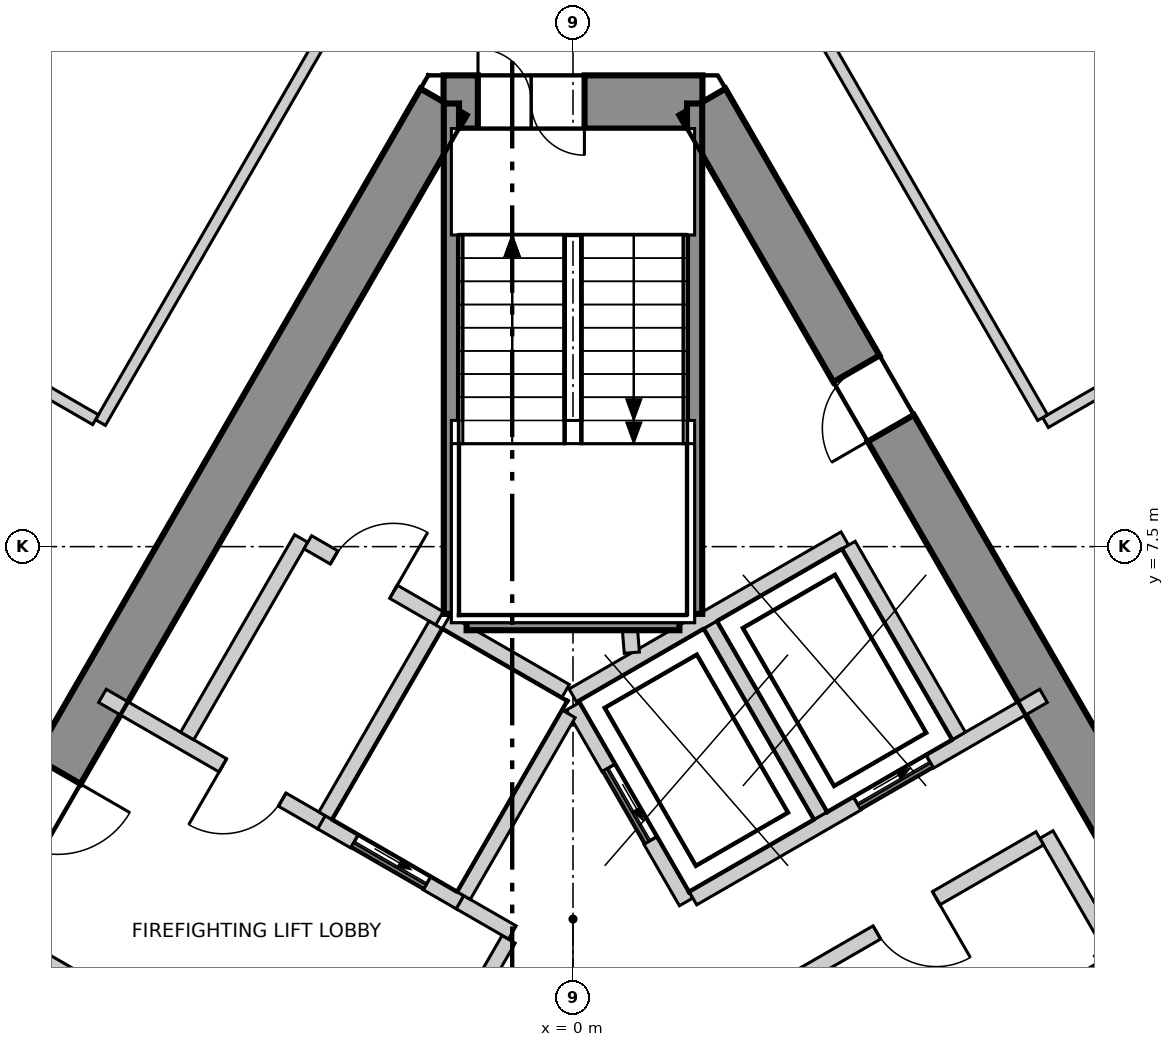
"""IFC4 building model, lengths in metres.
Left out: names, types, materials, properties, quantities, classifications, styles, units other than length and angle.
Written with IfcOpenShell. Run it as: python <this file> out.ifc"""

import sys

from ifc_helpers import new_model, si_unit, direction, frame, frame_2d, origin, place, context, subcontext, project, spatial, polyline, rectangle, outline, extrude, element, fill, save


model = new_model("IFC4")
c1 = context("Model", 3, precision=1e-05, world=origin(), true_north=direction((0.0, 1.0)))
c2 = subcontext(c1, "Body", "Model", "MODEL_VIEW")
j1 = project(units=[si_unit("LENGTHUNIT", "METRE"), si_unit("PLANEANGLEUNIT", "RADIAN")], contexts=[c1])
p1 = place(None, origin())
s1 = spatial("IfcSite", under=j1, at=p1, CompositionType="ELEMENT")
p2 = place(p1, origin())
s2 = spatial("IfcBuilding", under=s1, at=p2, CompositionType="ELEMENT")
p3 = place(p2, frame((0.0, 0.0, 255.8)))
s3 = spatial("IfcBuildingStorey", under=s2, at=p3, CompositionType="ELEMENT", Elevation=255.8)
p4 = place(p3, frame((1.703, 13.35, -0.6), z_axis=(0.0, 0.0, 1.0), x_axis=(-1.0, 0.0, 0.0)))
e1 = element("IfcWall", 1, at=p4, inside=s3, PredefinedType="SHEAR", context=c2, shape_type="SweptSolid", body=[
    extrude(outline(polyline([(-0.202, -0.35), (1.703, -0.35), (3.608, -0.35), (3.204, 0.35), (1.703, 0.35), (0.202, 0.35), (-0.202, -0.35)])), origin(), (0.0, 0.0, 1.0), 6.3),
])
p5 = place(p4, frame((1.553, 0.0, 0.6)))
e2 = element("IfcOpeningElement", 2, at=p5, cuts=e1, PredefinedType="OPENING", context=c2, shape_type="SweptSolid", body=[
    extrude(rectangle(XDim=1.4, YDim=2.1, at=frame_2d((0.7, 1.05))), frame((0.0, 0.36, 0.0), z_axis=(0.0, -1.0, 0.0), x_axis=(1.0, 0.0, 0.0)), (0.0, 0.0, 1.0), 0.72),
])
p6 = place(p3, frame((-1.703, 13.35, -0.6), z_axis=(0.0, 0.0, 1.0), x_axis=(-0.500011533395, -0.866018744874, 0.0)))
e3 = element("IfcWall", 3, at=p6, inside=s3, PredefinedType="SHEAR", context=c2, shape_type="SweptSolid", body=[
    extrude(outline(polyline([(-0.202, -0.35), (1.782, -0.35), (3.766, -0.35), (5.75, -0.35), (7.734, -0.35), (9.718, -0.35), (11.702, -0.35), (13.686, -0.35), (15.67, -0.35), (17.654, -0.35), (19.638, -0.35), (21.622, -0.35), (21.218, 0.35), (19.307, 0.35), (17.397, 0.35), (15.486, 0.35), (13.576, 0.35), (11.665, 0.35), (9.755, 0.35), (7.844, 0.35), (5.934, 0.35), (4.023, 0.35), (2.113, 0.35), (0.202, 0.35), (-0.202, -0.35)])), origin(), (0.0, 0.0, 1.0), 6.3),
])
p7 = place(p6, frame((10.16, 0.0, 0.6)))
e4 = element("IfcOpeningElement", 4, at=p7, cuts=e3, PredefinedType="OPENING", context=c2, shape_type="SweptSolid", body=[
    extrude(rectangle(XDim=1.1, YDim=2.1, at=frame_2d((0.55, 1.05))), frame((0.0, 0.36, 0.0), z_axis=(0.0, -1.0, 0.0), x_axis=(1.0, 0.0, 0.0)), (0.0, 0.0, 1.0), 0.72),
])
p8 = place(p3, frame((12.413, -5.2, -0.6), z_axis=(0.0, 0.0, 1.0), x_axis=(-0.500011533395, 0.866018744874, 0.0)))
e5 = element("IfcWall", 5, at=p8, inside=s3, PredefinedType="SHEAR", context=c2, shape_type="SweptSolid", body=[
    extrude(outline(polyline([(-0.202, -0.35), (1.782, -0.35), (3.766, -0.35), (5.75, -0.35), (7.734, -0.35), (9.718, -0.35), (11.702, -0.35), (13.686, -0.35), (15.67, -0.35), (17.654, -0.35), (19.638, -0.35), (21.622, -0.35), (21.218, 0.35), (19.307, 0.35), (17.397, 0.35), (15.486, 0.35), (13.576, 0.35), (11.665, 0.35), (9.755, 0.35), (7.844, 0.35), (5.934, 0.35), (4.023, 0.35), (2.113, 0.35), (0.202, 0.35), (-0.202, -0.35)])), origin(), (0.0, 0.0, 1.0), 6.3),
])
p9 = place(p8, frame((16.465, 0.0, 0.6)))
e6 = element("IfcOpeningElement", 6, at=p9, cuts=e5, PredefinedType="OPENING", context=c2, shape_type="SweptSolid", body=[
    extrude(rectangle(XDim=0.9, YDim=2.1, at=frame_2d((0.45, 1.05))), frame((0.0, 0.36, 0.0), z_axis=(0.0, -1.0, 0.0), x_axis=(1.0, 0.0, 0.0)), (0.0, 0.0, 1.0), 0.72),
])
p10 = place(p3, frame((-6.217, 9.132, 0.0), z_axis=(0.0, 0.0, 1.0), x_axis=(0.500076232498, 0.865981386458, 0.0)))
e7 = element("IfcWall", 7, at=p10, inside=s3, PredefinedType="PARTITIONING", context=c2, shape_type="SweptSolid", body=[
    extrude(rectangle(XDim=6.949, YDim=0.15, at=frame_2d((3.475, 0.0))), origin(), (0.0, 0.0, 1.0), 5.7),
])
p11 = place(p3, frame((-12.255, 12.618, 0.0), z_axis=(0.0, 0.0, 1.0), x_axis=(0.866054133163, -0.499950235956, 0.0)))
e8 = element("IfcWall", 8, at=p11, inside=s3, PredefinedType="PARTITIONING", context=c2, shape_type="SweptSolid", body=[
    extrude(rectangle(XDim=6.897, YDim=0.15, at=frame_2d((3.448, 0.0))), origin(), (0.0, 0.0, 1.0), 5.7),
])
p12 = place(p11, frame((2.886, 0.0, 0.0)))
e9 = element("IfcOpeningElement", 9, at=p12, cuts=e8, PredefinedType="OPENING", context=c2, shape_type="SweptSolid", body=[
    extrude(rectangle(XDim=1.2, YDim=2.1, at=frame_2d((0.6, 1.05))), frame((0.0, 0.085, 0.0), z_axis=(0.0, -1.0, 0.0), x_axis=(1.0, 0.0, 0.0)), (0.0, 0.0, 1.0), 0.17),
])
p13 = place(p3, frame((6.217, 9.132, 0.0), z_axis=(0.0, 0.0, 1.0), x_axis=(0.866032219707, 0.49998819429, 0.0)))
e10 = element("IfcWall", 10, at=p13, inside=s3, PredefinedType="PARTITIONING", context=c2, shape_type="SweptSolid", body=[
    extrude(rectangle(XDim=6.972, YDim=0.15, at=frame_2d((3.486, 0.0))), origin(), (0.0, 0.0, 1.0), 5.7),
])
p14 = place(p13, frame((2.886, 0.0, 0.0)))
e11 = element("IfcOpeningElement", 11, at=p14, cuts=e10, PredefinedType="OPENING", context=c2, shape_type="SweptSolid", body=[
    extrude(rectangle(XDim=1.2, YDim=2.1, at=frame_2d((0.6, 1.05))), frame((0.0, 0.085, 0.0), z_axis=(0.0, -1.0, 0.0), x_axis=(1.0, 0.0, 0.0)), (0.0, 0.0, 1.0), 0.17),
])
p15 = place(p3, frame((2.786, 15.075, 0.0), z_axis=(0.0, 0.0, 1.0), x_axis=(0.499938349595, -0.866060994737, 0.0)))
e12 = element("IfcWall", 12, at=p15, inside=s3, PredefinedType="PARTITIONING", context=c2, shape_type="SweptSolid", body=[
    extrude(rectangle(XDim=6.787, YDim=0.15, at=frame_2d((3.394, 0.0))), origin(), (0.0, 0.0, 1.0), 5.7),
])
p16 = place(p3, frame((-0.002, 5.541, 0.0), z_axis=(0.0, 0.0, 1.0), x_axis=(0.86600155993, 0.500041296494, 0.0)))
e13 = element("IfcWall", 13, at=p16, inside=s3, PredefinedType="SOLIDWALL", context=c2, shape_type="SweptSolid", body=[
    extrude(rectangle(XDim=4.132, YDim=0.2, at=frame_2d((2.066, 0.0))), origin(), (0.0, 0.0, 1.0), 5.7),
])
p17 = place(p3, frame((0.0, 5.4, 0.0), z_axis=(0.0, 0.0, 1.0), x_axis=(0.500103862429, -0.865965430478, 0.0)))
e14 = element("IfcWall", 14, at=p17, inside=s3, PredefinedType="SOLIDWALL", context=c2, shape_type="SweptSolid", body=[
    extrude(rectangle(XDim=2.973, YDim=0.2, at=frame_2d((1.487, 0.0))), origin(), (0.0, 0.0, 1.0), 5.7),
])
p18 = place(p17, frame((0.937, 0.0, 0.0)))
e15 = element("IfcOpeningElement", 15, at=p18, cuts=e14, PredefinedType="OPENING", context=c2, shape_type="SweptSolid", body=[
    extrude(rectangle(XDim=1.1, YDim=2.1, at=frame_2d((0.55, 1.05))), frame((0.0, 0.11, 0.0), z_axis=(0.0, -1.0, 0.0), x_axis=(1.0, 0.0, 0.0)), (0.0, 0.0, 1.0), 0.22),
])
p19 = place(p3, frame((1.578, 2.874, 0.0), z_axis=(0.0, 0.0, 1.0), x_axis=(0.866045911672, 0.499964477614, 0.0)))
e16 = element("IfcWall", 16, at=p19, inside=s3, PredefinedType="SOLIDWALL", context=c2, shape_type="SweptSolid", body=[
    extrude(rectangle(XDim=5.327, YDim=0.2, at=frame_2d((2.663, 0.0))), origin(), (0.0, 0.0, 1.0), 5.7),
])
p20 = place(p19, frame((2.496, 0.0, 0.0)))
e17 = element("IfcOpeningElement", 17, at=p20, cuts=e16, PredefinedType="OPENING", context=c2, shape_type="SweptSolid", body=[
    extrude(rectangle(XDim=1.1, YDim=2.1, at=frame_2d((0.55, 1.05))), frame((0.0, 0.11, 0.0), z_axis=(0.0, -1.0, 0.0), x_axis=(1.0, 0.0, 0.0)), (0.0, 0.0, 1.0), 0.22),
])
for number, where, z_axis, x_axis in (
    (18, (3.626, 7.52, 0.0), (0.0, 0.0, 1.0), (0.5, -0.866, 0.0)),
    (19, (1.807, 6.47, 0.0), (0.0, 0.0, 1.0), (0.5, -0.866, 0.0)),
):
    element("IfcWall", number, at=place(p3, frame(where, z_axis=z_axis, x_axis=x_axis)), inside=s3, PredefinedType="SOLIDWALL", context=c2, shape_type="SweptSolid", body=[
        extrude(rectangle(XDim=2.9, YDim=0.2, at=frame_2d((1.45, 0.0))), origin(), (0.0, 0.0, 1.0), 5.7),
    ])
p21 = place(p3, frame((6.229, 3.712, 0.0), z_axis=(0.0, 0.0, 1.0), x_axis=(0.499875724984, -0.86609714211, 0.0)))
e20 = element("IfcWall", 20, at=p21, inside=s3, PredefinedType="SOLIDWALL", context=c2, shape_type="SweptSolid", body=[
    extrude(rectangle(XDim=1.701, YDim=0.2, at=frame_2d((0.85, 0.0))), origin(), (0.0, 0.0, 1.0), 5.7),
])
p22 = place(p3, frame((2.548, 1.587, 0.0), z_axis=(0.0, 0.0, 1.0), x_axis=(0.866004344652, 0.500036473714, 0.0)))
e21 = element("IfcWall", 21, at=p22, inside=s3, PredefinedType="SOLIDWALL", context=c2, shape_type="SweptSolid", body=[
    extrude(rectangle(XDim=4.15, YDim=0.2, at=frame_2d((2.075, 0.0))), origin(), (0.0, 0.0, 1.0), 5.7),
])
p23 = place(p22, frame((1.675, 0.0, 0.0)))
e22 = element("IfcOpeningElement", 22, at=p23, cuts=e21, PredefinedType="OPENING", context=c2, shape_type="SweptSolid", body=[
    extrude(rectangle(XDim=0.9, YDim=2.1, at=frame_2d((0.45, 1.05))), frame((0.0, 0.11, 0.0), z_axis=(0.0, -1.0, 0.0), x_axis=(1.0, 0.0, 0.0)), (0.0, 0.0, 1.0), 0.22),
])
p24 = place(p3, frame((-7.891, 2.593, 0.0), z_axis=(0.0, 0.0, 1.0), x_axis=(0.866070917804, -0.499921159118, 0.0)))
e23 = element("IfcWall", 23, at=p24, inside=s3, PredefinedType="SOLIDWALL", context=c2, shape_type="SweptSolid", body=[
    extrude(rectangle(XDim=3.333, YDim=0.2, at=frame_2d((1.666, 0.0))), origin(), (0.0, 0.0, 1.0), 5.7),
])
p25 = place(p24, frame((1.73, 0.0, 0.0)))
e24 = element("IfcOpeningElement", 24, at=p25, cuts=e23, PredefinedType="OPENING", context=c2, shape_type="SweptSolid", body=[
    extrude(rectangle(XDim=1.1, YDim=2.1, at=frame_2d((0.55, 1.05))), frame((0.0, 0.11, 0.0), z_axis=(0.0, -1.0, 0.0), x_axis=(1.0, 0.0, 0.0)), (0.0, 0.0, 1.0), 0.22),
])
p26 = place(p3, frame((-6.191, 5.537, 0.0), z_axis=(0.0, 0.0, 1.0), x_axis=(0.866052607023, -0.499952879648, 0.0)))
e25 = element("IfcWall", 25, at=p26, inside=s3, PredefinedType="SOLIDWALL", context=c2, shape_type="SweptSolid", body=[
    extrude(rectangle(XDim=3.332, YDim=0.2, at=frame_2d((1.666, 0.0))), origin(), (0.0, 0.0, 1.0), 5.7),
])
p27 = place(p26, frame((1.83, 0.0, 0.0)))
e26 = element("IfcOpeningElement", 26, at=p27, cuts=e25, PredefinedType="OPENING", context=c2, shape_type="SweptSolid", body=[
    extrude(rectangle(XDim=0.9, YDim=2.1, at=frame_2d((0.45, 1.05))), frame((0.0, 0.11, 0.0), z_axis=(0.0, -1.0, 0.0), x_axis=(1.0, 0.0, 0.0)), (0.0, 0.0, 1.0), 0.22),
])
p28 = place(p3, frame((-1.488, 2.822, 0.0), z_axis=(0.0, 0.0, 1.0), x_axis=(0.866236612152, -0.499633997809, 0.0)))
e27 = element("IfcWall", 27, at=p28, inside=s3, PredefinedType="SOLIDWALL", context=c2, shape_type="SweptSolid", body=[
    extrude(rectangle(XDim=0.796, YDim=0.2, at=frame_2d((0.398, 0.0))), origin(), (0.0, 0.0, 1.0), 5.7),
])
p29 = place(p3, frame((-5.076, 5.009, 0.0), z_axis=(0.0, 0.0, 1.0), x_axis=(0.50002537861, 0.866010750942, 0.0)))
e28 = element("IfcWall", 28, at=p29, inside=s3, PredefinedType="SOLIDWALL", context=c2, shape_type="SweptSolid", body=[
    extrude(rectangle(XDim=3.0, YDim=0.2, at=frame_2d((1.5, 0.0))), origin(), (0.0, 0.0, 1.0), 5.7),
])
p30 = place(p3, frame((-3.489, 7.557, 0.0), z_axis=(0.0, 0.0, 1.0), x_axis=(0.866010750942, -0.50002537861, 0.0)))
e29 = element("IfcWall", 29, at=p30, inside=s3, PredefinedType="SOLIDWALL", context=c2, shape_type="SweptSolid", body=[
    extrude(rectangle(XDim=2.0, YDim=0.2, at=frame_2d((1.0, 0.0))), origin(), (0.0, 0.0, 1.0), 5.7),
])
p31 = place(p30, frame((0.401, 0.0, 0.0)))
e30 = element("IfcOpeningElement", 30, at=p31, cuts=e29, PredefinedType="OPENING", context=c2, shape_type="SweptSolid", body=[
    extrude(rectangle(XDim=0.9, YDim=2.1, at=frame_2d((0.45, 1.05))), frame((0.0, 0.11, 0.0), z_axis=(0.0, -1.0, 0.0), x_axis=(1.0, 0.0, 0.0)), (0.0, 0.0, 1.0), 0.22),
])
p32 = place(p3, frame((-2.444, -0.433, 0.0), z_axis=(0.0, 0.0, 1.0), x_axis=(0.500035624827, 0.866004834804, 0.0)))
e31 = element("IfcWall", 31, at=p32, inside=s3, PredefinedType="SOLIDWALL", context=c2, shape_type="SweptSolid", body=[
    extrude(rectangle(XDim=3.194, YDim=0.2, at=frame_2d((1.597, 0.0))), origin(), (0.0, 0.0, 1.0), 5.7),
])
p33 = place(p3, frame((-3.309, 3.873, 0.0), z_axis=(0.0, 0.0, 1.0), x_axis=(0.866098583652, -0.499873227325, 0.0)))
e32 = element("IfcWall", 32, at=p33, inside=s3, PredefinedType="SOLIDWALL", context=c2, shape_type="SweptSolid", body=[
    extrude(rectangle(XDim=2.103, YDim=0.2, at=frame_2d((1.051, 0.0))), origin(), (0.0, 0.0, 1.0), 5.7),
])
p34 = place(p33, frame((0.502, 0.0, 0.0)))
e33 = element("IfcOpeningElement", 33, at=p34, cuts=e32, PredefinedType="OPENING", context=c2, shape_type="SweptSolid", body=[
    extrude(rectangle(XDim=1.1, YDim=2.1, at=frame_2d((0.55, 1.05))), frame((0.0, 0.11, 0.0), z_axis=(0.0, -1.0, 0.0), x_axis=(1.0, 0.0, 0.0)), (0.0, 0.0, 1.0), 0.22),
])
p35 = place(p3, frame((-3.257, 3.959, 0.0), z_axis=(0.0, 0.0, 1.0), x_axis=(0.50012328804, 0.865954211699, 0.0)))
e34 = element("IfcWall", 34, at=p35, inside=s3, PredefinedType="SOLIDWALL", context=c2, shape_type="SweptSolid", body=[
    extrude(rectangle(XDim=2.9, YDim=0.2, at=frame_2d((1.45, 0.0))), origin(), (0.0, 0.0, 1.0), 5.7),
])
p36 = place(p3, frame((-1.67, 6.507, 0.0), z_axis=(0.0, 0.0, 1.0), x_axis=(0.865941441609, -0.500145398563, 0.0)))
e35 = element("IfcWall", 35, at=p36, inside=s3, PredefinedType="SOLIDWALL", context=c2, shape_type="SweptSolid", body=[
    extrude(rectangle(XDim=1.815, YDim=0.2, at=frame_2d((0.908, 0.0))), origin(), (0.0, 0.0, 1.0), 5.7),
])
p37 = place(p3, frame((-1.438, 2.909, 0.0), z_axis=(0.0, 0.0, 1.0), x_axis=(0.499829630636, 0.866123744241, 0.0)))
e36 = element("IfcWall", 36, at=p37, inside=s3, PredefinedType="SOLIDWALL", context=c2, shape_type="SweptSolid", body=[
    extrude(rectangle(XDim=2.761, YDim=0.2, at=frame_2d((1.38, 0.0))), origin(), (0.0, 0.0, 1.0), 5.7),
])
p38 = place(p3, frame((0.75, 6.4, 0.0), z_axis=(0.0, 0.0, 1.0), x_axis=(0.080860177601, -0.996725454515, 0.0)))
e37 = element("IfcWall", 37, at=p38, inside=s3, PredefinedType="SOLIDWALL", context=c2, shape_type="SweptSolid", body=[
    extrude(rectangle(XDim=0.296, YDim=0.2, at=frame_2d((0.148, 0.0))), origin(), (0.0, 0.0, 1.0), 5.7),
])
p39 = place(p3, frame((6.826, 1.978, 0.0), z_axis=(0.0, 0.0, 1.0), x_axis=(0.499990139034, -0.866031096941, 0.0)))
e38 = element("IfcWall", 38, at=p39, inside=s3, PredefinedType="SOLIDWALL", context=c2, shape_type="SweptSolid", body=[
    extrude(rectangle(XDim=3.0, YDim=0.2, at=frame_2d((1.5, 0.0))), origin(), (0.0, 0.0, 1.0), 5.7),
])
p40 = place(p3, frame((1.6, 6.615, 0.0), z_axis=(0.0, 0.0, 1.0), x_axis=(0.0, 1.0, 0.0)))
e39 = element("IfcWall", 39, at=p40, inside=s3, PredefinedType="SOLIDWALL", context=c2, shape_type="SweptSolid", body=[
    extrude(rectangle(XDim=6.715, YDim=0.2, at=frame_2d((3.357, 0.0))), origin(), (0.0, 0.0, 1.0), 5.7),
])
p41 = place(p3, frame((-1.4, 6.5, 0.0), z_axis=(0.0, 0.0, 1.0), x_axis=(1.0, 0.0, 0.0)))
e40 = element("IfcWall", 40, at=p41, inside=s3, PredefinedType="SOLIDWALL", context=c2, shape_type="SweptSolid", body=[
    extrude(rectangle(XDim=2.8, YDim=0.2, at=frame_2d((1.4, 0.0))), origin(), (0.0, 0.0, 1.0), 5.7),
])
p42 = place(p3, frame((-1.6, 6.615, 0.0), z_axis=(0.0, 0.0, 1.0), x_axis=(0.0, 1.0, 0.0)))
e41 = element("IfcWall", 41, at=p42, inside=s3, PredefinedType="SOLIDWALL", context=c2, shape_type="SweptSolid", body=[
    extrude(rectangle(XDim=6.715, YDim=0.2, at=frame_2d((3.357, 0.0))), origin(), (0.0, 0.0, 1.0), 5.7),
])
p43 = place(p18, origin())
e42 = element("IfcDoor", 42, at=p43, inside=s3, OperationType="SLIDING_TO_LEFT", PredefinedType="DOOR", context=c2, shape_type="SweptSolid", body=[
    extrude(rectangle(XDim=1.1, YDim=2.1, at=frame_2d((0.55, 1.05))), frame((0.0, 0.025, 0.0), z_axis=(0.0, -1.0, 0.0), x_axis=(1.0, 0.0, 0.0)), (0.0, 0.0, 1.0), 0.05),
])
fill(e15, e42)
p44 = place(p20, origin())
e43 = element("IfcDoor", 43, at=p44, inside=s3, OperationType="SLIDING_TO_LEFT", PredefinedType="DOOR", context=c2, shape_type="SweptSolid", body=[
    extrude(rectangle(XDim=1.1, YDim=2.1, at=frame_2d((0.55, 1.05))), frame((0.0, 0.025, 0.0), z_axis=(0.0, -1.0, 0.0), x_axis=(1.0, 0.0, 0.0)), (0.0, 0.0, 1.0), 0.05),
])
fill(e17, e43)
p45 = place(p34, origin())
e44 = element("IfcDoor", 44, at=p45, inside=s3, OperationType="SLIDING_TO_LEFT", PredefinedType="DOOR", context=c2, shape_type="SweptSolid", body=[
    extrude(rectangle(XDim=1.1, YDim=2.1, at=frame_2d((0.55, 1.05))), frame((0.0, 0.025, 0.0), z_axis=(0.0, -1.0, 0.0), x_axis=(1.0, 0.0, 0.0)), (0.0, 0.0, 1.0), 0.05),
])
fill(e33, e44)
p46 = place(p27, origin())
e45 = element("IfcDoor", 45, at=p46, inside=s3, OperationType="SINGLE_SWING_LEFT", PredefinedType="DOOR", context=c2, shape_type="SweptSolid", body=[
    extrude(rectangle(XDim=0.9, YDim=2.1, at=frame_2d((0.45, 1.05))), frame((0.0, 0.025, 0.0), z_axis=(0.0, -1.0, 0.0), x_axis=(1.0, 0.0, 0.0)), (0.0, 0.0, 1.0), 0.05),
])
fill(e26, e45)
p47 = place(p5, origin())
e46 = element("IfcDoor", 46, at=p47, inside=s3, OperationType="DOUBLE_DOOR_SINGLE_SWING", PredefinedType="DOOR", context=c2, shape_type="SweptSolid", body=[
    extrude(rectangle(XDim=1.4, YDim=2.1, at=frame_2d((0.7, 1.05))), frame((0.0, 0.025, 0.0), z_axis=(0.0, -1.0, 0.0), x_axis=(1.0, 0.0, 0.0)), (0.0, 0.0, 1.0), 0.05),
])
fill(e2, e46)
p48 = place(p7, origin())
e47 = element("IfcDoor", 47, at=p48, inside=s3, OperationType="SINGLE_SWING_RIGHT", PredefinedType="DOOR", context=c2, shape_type="SweptSolid", body=[
    extrude(rectangle(XDim=1.1, YDim=2.1, at=frame_2d((0.55, 1.05))), frame((0.0, 0.025, 0.0), z_axis=(0.0, -1.0, 0.0), x_axis=(1.0, 0.0, 0.0)), (0.0, 0.0, 1.0), 0.05),
])
fill(e4, e47)
p49 = place(p31, origin())
e48 = element("IfcDoor", 48, at=p49, inside=s3, OperationType="SINGLE_SWING_LEFT", PredefinedType="DOOR", context=c2, shape_type="SweptSolid", body=[
    extrude(rectangle(XDim=0.9, YDim=2.1, at=frame_2d((0.45, 1.05))), frame((0.0, 0.025, 0.0), z_axis=(0.0, -1.0, 0.0), x_axis=(1.0, 0.0, 0.0)), (0.0, 0.0, 1.0), 0.05),
])
fill(e30, e48)
p50 = place(p9, origin())
e49 = element("IfcDoor", 49, at=p50, inside=s3, OperationType="SINGLE_SWING_RIGHT", PredefinedType="DOOR", context=c2, shape_type="SweptSolid", body=[
    extrude(rectangle(XDim=0.9, YDim=2.1, at=frame_2d((0.45, 1.05))), frame((0.0, 0.025, 0.0), z_axis=(0.0, -1.0, 0.0), x_axis=(1.0, 0.0, 0.0)), (0.0, 0.0, 1.0), 0.05),
])
fill(e6, e49)
p51 = place(p23, origin())
e50 = element("IfcDoor", 50, at=p51, inside=s3, OperationType="SINGLE_SWING_RIGHT", PredefinedType="DOOR", context=c2, shape_type="SweptSolid", body=[
    extrude(rectangle(XDim=0.9, YDim=2.1, at=frame_2d((0.45, 1.05))), frame((0.0, 0.025, 0.0), z_axis=(0.0, -1.0, 0.0), x_axis=(1.0, 0.0, 0.0)), (0.0, 0.0, 1.0), 0.05),
])
fill(e22, e50)
save(model, sys.argv[1])
